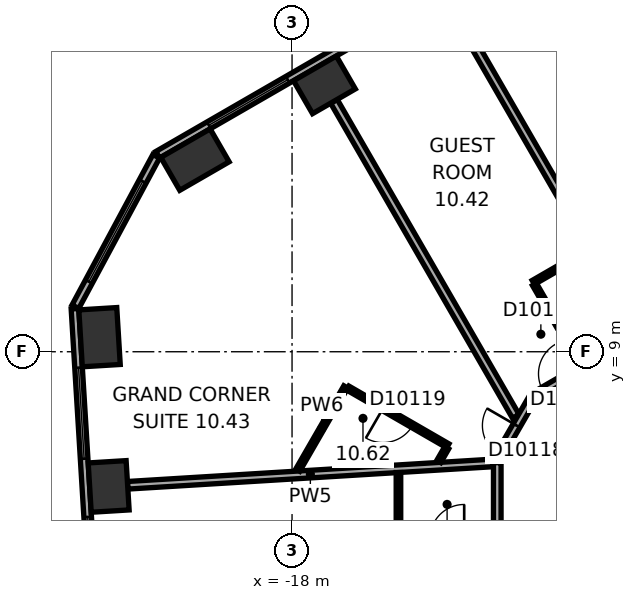
"""IFC4 building model, lengths in metres.
Left out: names, types, materials, properties, quantities, classifications, styles, units other than length and angle.
Written with IfcOpenShell. Run it as: python <this file> out.ifc"""

import sys

from ifc_helpers import new_model, si_unit, direction, frame, frame_2d, origin, origin_2d, place, context, subcontext, project, spatial, rectangle, extrude, element, fill, save


model = new_model("IFC4")
c1 = context("Model", 3, precision=1e-05, world=origin(), true_north=direction((0.0, 1.0)))
c2 = subcontext(c1, "Body", "Model", "MODEL_VIEW")
j1 = project(units=[si_unit("LENGTHUNIT", "METRE"), si_unit("PLANEANGLEUNIT", "RADIAN")], contexts=[c1])
p1 = place(None, origin())
s1 = spatial("IfcSite", under=j1, at=p1, CompositionType="ELEMENT")
p2 = place(p1, origin())
s2 = spatial("IfcBuilding", under=s1, at=p2, CompositionType="ELEMENT")
p3 = place(p2, frame((0.0, 0.0, 53.9)))
s3 = spatial("IfcBuildingStorey", under=s2, at=p3, CompositionType="ELEMENT", Elevation=53.9)
p4 = place(p3, frame((-17.148, 16.023, 0.0), z_axis=(0.0, 0.0, 1.0), x_axis=(-0.866025403784, -0.5, 0.0)))
e1 = element("IfcColumn", 1, at=p4, inside=s3, PredefinedType="COLUMN", context=c2, shape_type="SweptSolid", body=[
    extrude(rectangle(XDim=1.3, YDim=1.0, at=origin_2d()), origin(), (0.0, 0.0, 1.0), 3.3),
])
for number, where, z_axis, x_axis in (
    (2, (-20.555, 14.055, 0.0), (0.0, 0.0, 1.0), (-0.866, -0.5, 0.0)),
    (3, (-23.066, 9.383, 0.0), (0.0, 0.0, 1.0), (0.061, -0.998, 0.0)),
):
    element("IfcColumn", number, at=place(p3, frame(where, z_axis=z_axis, x_axis=x_axis)), inside=s3, PredefinedType="COLUMN", context=c2, shape_type="SweptSolid", body=[
        extrude(rectangle(XDim=1.5, YDim=1.0, at=origin_2d()), origin(), (0.0, 0.0, 1.0), 3.3),
    ])
p5 = place(p3, frame((-22.826, 5.456, 0.0), z_axis=(0.0, 0.0, 1.0), x_axis=(0.061048539535, -0.998134798422, 0.0)))
e4 = element("IfcColumn", 4, at=p5, inside=s3, PredefinedType="COLUMN", context=c2, shape_type="SweptSolid", body=[
    extrude(rectangle(XDim=1.3, YDim=1.0, at=origin_2d()), origin(), (0.0, 0.0, 1.0), 3.3),
])
p6 = place(p3, frame((-3.136, 24.805, 0.0), z_axis=(0.0, 0.0, 1.0), x_axis=(-0.866028291626, -0.499994998079, 0.0)))
e5 = element("IfcWall", 5, at=p6, inside=s3, PredefinedType="STANDARD", context=c2, shape_type="SweptSolid", body=[
    extrude(rectangle(XDim=21.246, YDim=0.2, at=frame_2d((10.623, 0.0))), origin(), (0.0, 0.0, 1.0), 3.3),
])
p7 = place(p6, frame((1.555, 0.0, 0.8)))
e6 = element("IfcOpeningElement", 6, at=p7, cuts=e5, PredefinedType="OPENING", context=c2, shape_type="SweptSolid", body=[
    extrude(rectangle(XDim=2.4, YDim=1.7, at=frame_2d((1.2, 0.85))), frame((0.0, 0.11, 0.0), z_axis=(0.0, -1.0, 0.0), x_axis=(1.0, 0.0, 0.0)), (0.0, 0.0, 1.0), 0.22),
])
p8 = place(p6, frame((5.489, 0.0, 0.8)))
e7 = element("IfcOpeningElement", 7, at=p8, cuts=e5, PredefinedType="OPENING", context=c2, shape_type="SweptSolid", body=[
    extrude(rectangle(XDim=2.4, YDim=1.7, at=frame_2d((1.2, 0.85))), frame((0.0, 0.11, 0.0), z_axis=(0.0, -1.0, 0.0), x_axis=(1.0, 0.0, 0.0)), (0.0, 0.0, 1.0), 0.22),
])
p9 = place(p6, frame((9.424, 0.0, 0.8)))
e8 = element("IfcOpeningElement", 8, at=p9, cuts=e5, PredefinedType="OPENING", context=c2, shape_type="SweptSolid", body=[
    extrude(rectangle(XDim=2.4, YDim=1.7, at=frame_2d((1.2, 0.85))), frame((0.0, 0.11, 0.0), z_axis=(0.0, -1.0, 0.0), x_axis=(1.0, 0.0, 0.0)), (0.0, 0.0, 1.0), 0.22),
])
p10 = place(p6, frame((13.358, 0.0, 0.8)))
e9 = element("IfcOpeningElement", 9, at=p10, cuts=e5, PredefinedType="OPENING", context=c2, shape_type="SweptSolid", body=[
    extrude(rectangle(XDim=2.4, YDim=1.7, at=frame_2d((1.2, 0.85))), frame((0.0, 0.11, 0.0), z_axis=(0.0, -1.0, 0.0), x_axis=(1.0, 0.0, 0.0)), (0.0, 0.0, 1.0), 0.22),
])
p11 = place(p6, frame((17.293, 0.0, 0.8)))
e10 = element("IfcOpeningElement", 10, at=p11, cuts=e5, PredefinedType="OPENING", context=c2, shape_type="SweptSolid", body=[
    extrude(rectangle(XDim=2.4, YDim=1.7, at=frame_2d((1.2, 0.85))), frame((0.0, 0.11, 0.0), z_axis=(0.0, -1.0, 0.0), x_axis=(1.0, 0.0, 0.0)), (0.0, 0.0, 1.0), 0.22),
])
p12 = place(p3, frame((-21.574, 14.143, 0.0), z_axis=(0.0, 0.0, 1.0), x_axis=(-0.473292949472, -0.880905093628, 0.0)))
e11 = element("IfcWall", 11, at=p12, inside=s3, PredefinedType="STANDARD", context=c2, shape_type="SweptSolid", body=[
    extrude(rectangle(XDim=4.494, YDim=0.2, at=frame_2d((2.247, 0.0))), origin(), (0.0, 0.0, 1.0), 3.3),
])
p13 = place(p12, frame((0.747, 0.0, 0.8)))
e12 = element("IfcOpeningElement", 12, at=p13, cuts=e11, PredefinedType="OPENING", context=c2, shape_type="SweptSolid", body=[
    extrude(rectangle(XDim=3.0, YDim=1.7, at=frame_2d((1.5, 0.85))), frame((0.0, 0.11, 0.0), z_axis=(0.0, -1.0, 0.0), x_axis=(1.0, 0.0, 0.0)), (0.0, 0.0, 1.0), 0.22),
])
p14 = place(p3, frame((-23.713, 10.131, 0.0), z_axis=(0.0, 0.0, 1.0), x_axis=(0.061040439785, -0.998135293791, 0.0)))
e13 = element("IfcWall", 13, at=p14, inside=s3, PredefinedType="STANDARD", context=c2, shape_type="SweptSolid", body=[
    extrude(rectangle(XDim=21.246, YDim=0.2, at=frame_2d((10.623, 0.0))), origin(), (0.0, 0.0, 1.0), 3.3),
])
p15 = place(p14, frame((1.553, 0.0, 0.8)))
e14 = element("IfcOpeningElement", 14, at=p15, cuts=e13, PredefinedType="OPENING", context=c2, shape_type="SweptSolid", body=[
    extrude(rectangle(XDim=2.4, YDim=1.7, at=frame_2d((1.2, 0.85))), frame((0.0, 0.11, 0.0), z_axis=(0.0, -1.0, 0.0), x_axis=(1.0, 0.0, 0.0)), (0.0, 0.0, 1.0), 0.22),
])
p16 = place(p14, frame((5.488, 0.0, 0.8)))
e15 = element("IfcOpeningElement", 15, at=p16, cuts=e13, PredefinedType="OPENING", context=c2, shape_type="SweptSolid", body=[
    extrude(rectangle(XDim=2.4, YDim=1.7, at=frame_2d((1.2, 0.85))), frame((0.0, 0.11, 0.0), z_axis=(0.0, -1.0, 0.0), x_axis=(1.0, 0.0, 0.0)), (0.0, 0.0, 1.0), 0.22),
])
p17 = place(p14, frame((9.422, 0.0, 0.8)))
e16 = element("IfcOpeningElement", 16, at=p17, cuts=e13, PredefinedType="OPENING", context=c2, shape_type="SweptSolid", body=[
    extrude(rectangle(XDim=2.4, YDim=1.7, at=frame_2d((1.2, 0.85))), frame((0.0, 0.11, 0.0), z_axis=(0.0, -1.0, 0.0), x_axis=(1.0, 0.0, 0.0)), (0.0, 0.0, 1.0), 0.22),
])
p18 = place(p14, frame((13.357, 0.0, 0.8)))
e17 = element("IfcOpeningElement", 17, at=p18, cuts=e13, PredefinedType="OPENING", context=c2, shape_type="SweptSolid", body=[
    extrude(rectangle(XDim=2.4, YDim=1.7, at=frame_2d((1.2, 0.85))), frame((0.0, 0.11, 0.0), z_axis=(0.0, -1.0, 0.0), x_axis=(1.0, 0.0, 0.0)), (0.0, 0.0, 1.0), 0.22),
])
p19 = place(p14, frame((17.292, 0.0, 0.8)))
e18 = element("IfcOpeningElement", 18, at=p19, cuts=e13, PredefinedType="OPENING", context=c2, shape_type="SweptSolid", body=[
    extrude(rectangle(XDim=2.4, YDim=1.7, at=frame_2d((1.2, 0.85))), frame((0.0, 0.11, 0.0), z_axis=(0.0, -1.0, 0.0), x_axis=(1.0, 0.0, 0.0)), (0.0, 0.0, 1.0), 0.22),
])
p20 = place(p3, frame((-22.327, 5.486, 0.0), z_axis=(0.0, 0.0, 1.0), x_axis=(0.998135194863, 0.061042057435, 0.0)))
e19 = element("IfcWall", 19, at=p20, inside=s3, PredefinedType="PARTITIONING", context=c2, shape_type="SweptSolid", body=[
    extrude(rectangle(XDim=9.635, YDim=0.2, at=frame_2d((4.817, 0.0))), origin(), (0.0, 0.0, 1.0), 3.05),
])
p21 = place(p3, frame((-17.849, 5.885, 0.0), z_axis=(0.0, 0.0, 1.0), x_axis=(0.500034589094, 0.866005432841, 0.0)))
e20 = element("IfcWall", 20, at=p21, inside=s3, PredefinedType="PARTITIONING", context=c2, shape_type="SweptSolid", body=[
    extrude(rectangle(XDim=2.528, YDim=0.12, at=frame_2d((1.264, 0.0))), origin(), (0.0, 0.0, 1.0), 3.05),
])
p22 = place(p3, frame((-16.898, 15.59, 0.0), z_axis=(0.0, 0.0, 1.0), x_axis=(0.500023458698, -0.866011859475, 0.0)))
e21 = element("IfcWall", 21, at=p22, inside=s3, PredefinedType="PARTITIONING", context=c2, shape_type="SweptSolid", body=[
    extrude(rectangle(XDim=9.572, YDim=0.2, at=frame_2d((4.786, 0.0))), origin(), (0.0, 0.0, 1.0), 3.05),
])
p23 = place(p3, frame((-16.533, 8.044, 0.0), z_axis=(0.0, 0.0, 1.0), x_axis=(0.86601037836, -0.500026023896, 0.0)))
e22 = element("IfcWall", 22, at=p23, inside=s3, PredefinedType="PARTITIONING", context=c2, shape_type="SweptSolid", body=[
    extrude(rectangle(XDim=3.04, YDim=0.12, at=frame_2d((1.52, 0.0))), origin(), (0.0, 0.0, 1.0), 3.05),
])
p24 = place(p23, frame((1.07, 0.0, 0.0)))
e23 = element("IfcOpeningElement", 23, at=p24, cuts=e22, PredefinedType="OPENING", context=c2, shape_type="SweptSolid", body=[
    extrude(rectangle(XDim=0.9, YDim=2.1, at=frame_2d((0.45, 1.05))), frame((0.0, 0.07, 0.0), z_axis=(0.0, -1.0, 0.0), x_axis=(1.0, 0.0, 0.0)), (0.0, 0.0, 1.0), 0.14),
])
p25 = place(p3, frame((-15.2, 4.081, 0.0), z_axis=(0.0, 0.0, 1.0), x_axis=(0.0, 1.0, 0.0)))
e24 = element("IfcWall", 24, at=p25, inside=s3, PredefinedType="PARTITIONING", context=c2, shape_type="SweptSolid", body=[
    extrude(rectangle(XDim=1.741, YDim=0.12, at=frame_2d((0.871, 0.0))), origin(), (0.0, 0.0, 1.0), 3.05),
])
p26 = place(p3, frame((-13.931, 6.472, 0.0), z_axis=(0.0, 0.0, 1.0), x_axis=(-0.499739399214, -0.866175809448, 0.0)))
e25 = element("IfcWall", 25, at=p26, inside=s3, PredefinedType="PARTITIONING", context=c2, shape_type="SweptSolid", body=[
    extrude(rectangle(XDim=0.416, YDim=0.12, at=frame_2d((0.208, 0.0))), origin(), (0.0, 0.0, 1.0), 3.05),
])
p27 = place(p3, frame((-12.6, 6.081, 0.0), z_axis=(0.0, 0.0, 1.0), x_axis=(0.0, -1.0, 0.0)))
e26 = element("IfcWall", 26, at=p27, inside=s3, PredefinedType="PARTITIONING", context=c2, shape_type="SweptSolid", body=[
    extrude(rectangle(XDim=12.219, YDim=0.2, at=frame_2d((6.109, 0.0))), origin(), (0.0, 0.0, 1.0), 3.05),
])
p28 = place(p27, frame((2.546, 0.0, 0.0)))
e27 = element("IfcOpeningElement", 27, at=p28, cuts=e26, PredefinedType="OPENING", context=c2, shape_type="SweptSolid", body=[
    extrude(rectangle(XDim=0.9, YDim=2.1, at=frame_2d((0.45, 1.05))), frame((0.0, 0.11, 0.0), z_axis=(0.0, -1.0, 0.0), x_axis=(1.0, 0.0, 0.0)), (0.0, 0.0, 1.0), 0.22),
])
p29 = place(p27, frame((4.217, 0.0, 0.0)))
e28 = element("IfcOpeningElement", 28, at=p29, cuts=e26, PredefinedType="OPENING", context=c2, shape_type="SweptSolid", body=[
    extrude(rectangle(XDim=0.9, YDim=2.1, at=frame_2d((0.45, 1.05))), frame((0.0, 0.11, 0.0), z_axis=(0.0, -1.0, 0.0), x_axis=(1.0, 0.0, 0.0)), (0.0, 0.0, 1.0), 0.22),
])
p30 = place(p27, frame((10.43, 0.0, 0.0)))
e29 = element("IfcOpeningElement", 29, at=p30, cuts=e26, PredefinedType="OPENING", context=c2, shape_type="SweptSolid", body=[
    extrude(rectangle(XDim=0.9, YDim=2.1, at=frame_2d((0.45, 1.05))), frame((0.0, 0.11, 0.0), z_axis=(0.0, -1.0, 0.0), x_axis=(1.0, 0.0, 0.0)), (0.0, 0.0, 1.0), 0.22),
])
p31 = place(p3, frame((-11.65, 7.823, 0.0), z_axis=(0.0, 0.0, 1.0), x_axis=(-0.500063520245, -0.865988727248, 0.0)))
e30 = element("IfcWall", 30, at=p31, inside=s3, PredefinedType="PARTITIONING", context=c2, shape_type="SweptSolid", body=[
    extrude(rectangle(XDim=1.9, YDim=0.2, at=frame_2d((0.95, 0.0))), origin(), (0.0, 0.0, 1.0), 3.05),
])
p32 = place(p31, frame((0.882, 0.0, 0.0)))
e31 = element("IfcOpeningElement", 31, at=p32, cuts=e30, PredefinedType="OPENING", context=c2, shape_type="SweptSolid", body=[
    extrude(rectangle(XDim=0.9, YDim=2.1, at=frame_2d((0.45, 1.05))), frame((0.0, 0.11, 0.0), z_axis=(0.0, -1.0, 0.0), x_axis=(1.0, 0.0, 0.0)), (0.0, 0.0, 1.0), 0.22),
])
p33 = place(p3, frame((-11.651, 10.825, 0.0), z_axis=(0.0, 0.0, 1.0), x_axis=(0.865998477143, 0.500046635412, 0.0)))
e32 = element("IfcWall", 32, at=p33, inside=s3, PredefinedType="PARTITIONING", context=c2, shape_type="SweptSolid", body=[
    extrude(rectangle(XDim=1.673, YDim=0.12, at=frame_2d((0.836, 0.0))), origin(), (0.0, 0.0, 1.0), 3.05),
])
p34 = place(p3, frame((-10.401, 8.66, 0.0), z_axis=(0.0, 0.0, 1.0), x_axis=(-0.500077547548, 0.865980627057, 0.0)))
e33 = element("IfcWall", 33, at=p34, inside=s3, PredefinedType="PARTITIONING", context=c2, shape_type="SweptSolid", body=[
    extrude(rectangle(XDim=2.44, YDim=0.12, at=frame_2d((1.22, 0.0))), origin(), (0.0, 0.0, 1.0), 3.05),
])
p35 = place(p34, frame((0.77, 0.0, 0.0)))
e34 = element("IfcOpeningElement", 34, at=p35, cuts=e33, PredefinedType="OPENING", context=c2, shape_type="SweptSolid", body=[
    extrude(rectangle(XDim=0.9, YDim=2.1, at=frame_2d((0.45, 1.05))), frame((0.0, 0.07, 0.0), z_axis=(0.0, -1.0, 0.0), x_axis=(1.0, 0.0, 0.0)), (0.0, 0.0, 1.0), 0.14),
])
p36 = place(p3, frame((-8.902, 9.41, 0.0), z_axis=(0.0, 0.0, 1.0), x_axis=(-0.866014299198, -0.500019233215, 0.0)))
e35 = element("IfcWall", 35, at=p36, inside=s3, PredefinedType="PARTITIONING", context=c2, shape_type="SweptSolid", body=[
    extrude(rectangle(XDim=3.133, YDim=0.2, at=frame_2d((1.567, 0.0))), origin(), (0.0, 0.0, 1.0), 3.05),
])
p37 = place(p36, frame((1.978, 0.0, 0.0)))
e36 = element("IfcOpeningElement", 36, at=p37, cuts=e35, PredefinedType="OPENING", context=c2, shape_type="SweptSolid", body=[
    extrude(rectangle(XDim=0.9, YDim=2.1, at=frame_2d((0.45, 1.05))), frame((0.0, 0.11, 0.0), z_axis=(0.0, -1.0, 0.0), x_axis=(1.0, 0.0, 0.0)), (0.0, 0.0, 1.0), 0.22),
])
p38 = place(p3, frame((-7.865, 7.814, 0.0), z_axis=(0.0, 0.0, 1.0), x_axis=(-0.500004234368, 0.866022959057, 0.0)))
e37 = element("IfcWall", 37, at=p38, inside=s3, PredefinedType="PARTITIONING", context=c2, shape_type="SweptSolid", body=[
    extrude(rectangle(XDim=11.25, YDim=0.2, at=frame_2d((5.625, 0.0))), origin(), (0.0, 0.0, 1.0), 3.05),
])
p39 = place(p38, frame((0.5, 0.0, 0.0)))
e38 = element("IfcOpeningElement", 38, at=p39, cuts=e37, PredefinedType="OPENING", context=c2, shape_type="SweptSolid", body=[
    extrude(rectangle(XDim=0.9, YDim=2.1, at=frame_2d((0.45, 1.05))), frame((0.0, 0.11, 0.0), z_axis=(0.0, -1.0, 0.0), x_axis=(1.0, 0.0, 0.0)), (0.0, 0.0, 1.0), 0.22),
])
p40 = place(p11, origin())
e39 = element("IfcWindow", 39, at=p40, inside=s3, PartitioningType="SINGLE_PANEL", PredefinedType="WINDOW", context=c2, shape_type="SweptSolid", body=[
    extrude(rectangle(XDim=2.4, YDim=1.7, at=frame_2d((1.2, 0.85))), frame((0.0, 0.03, 0.0), z_axis=(0.0, -1.0, 0.0), x_axis=(1.0, 0.0, 0.0)), (0.0, 0.0, 1.0), 0.06),
])
fill(e10, e39)
p41 = place(p13, origin())
e40 = element("IfcWindow", 40, at=p41, inside=s3, PartitioningType="SINGLE_PANEL", PredefinedType="WINDOW", context=c2, shape_type="SweptSolid", body=[
    extrude(rectangle(XDim=3.0, YDim=1.7, at=frame_2d((1.5, 0.85))), frame((0.0, 0.03, 0.0), z_axis=(0.0, -1.0, 0.0), x_axis=(1.0, 0.0, 0.0)), (0.0, 0.0, 1.0), 0.06),
])
fill(e12, e40)
p42 = place(p15, origin())
e41 = element("IfcWindow", 41, at=p42, inside=s3, PartitioningType="SINGLE_PANEL", PredefinedType="WINDOW", context=c2, shape_type="SweptSolid", body=[
    extrude(rectangle(XDim=2.4, YDim=1.7, at=frame_2d((1.2, 0.85))), frame((0.0, 0.03, 0.0), z_axis=(0.0, -1.0, 0.0), x_axis=(1.0, 0.0, 0.0)), (0.0, 0.0, 1.0), 0.06),
])
fill(e14, e41)
p43 = place(p16, origin())
e42 = element("IfcWindow", 42, at=p43, inside=s3, PartitioningType="SINGLE_PANEL", PredefinedType="WINDOW", context=c2, shape_type="SweptSolid", body=[
    extrude(rectangle(XDim=2.4, YDim=1.7, at=frame_2d((1.2, 0.85))), frame((0.0, 0.03, 0.0), z_axis=(0.0, -1.0, 0.0), x_axis=(1.0, 0.0, 0.0)), (0.0, 0.0, 1.0), 0.06),
])
fill(e15, e42)
p44 = place(p37, origin())
e43 = element("IfcDoor", 43, at=p44, inside=s3, OperationType="SINGLE_SWING_LEFT", PredefinedType="DOOR", context=c2, shape_type="SweptSolid", body=[
    extrude(rectangle(XDim=0.9, YDim=2.1, at=frame_2d((0.45, 1.05))), frame((0.0, 0.025, 0.0), z_axis=(0.0, -1.0, 0.0), x_axis=(1.0, 0.0, 0.0)), (0.0, 0.0, 1.0), 0.05),
])
fill(e36, e43)
p45 = place(p35, origin())
e44 = element("IfcDoor", 44, at=p45, inside=s3, OperationType="SINGLE_SWING_LEFT", PredefinedType="DOOR", context=c2, shape_type="SweptSolid", body=[
    extrude(rectangle(XDim=0.9, YDim=2.1, at=frame_2d((0.45, 1.05))), frame((0.0, 0.025, 0.0), z_axis=(0.0, -1.0, 0.0), x_axis=(1.0, 0.0, 0.0)), (0.0, 0.0, 1.0), 0.05),
])
fill(e34, e44)
p46 = place(p32, origin())
e45 = element("IfcDoor", 45, at=p46, inside=s3, OperationType="SINGLE_SWING_LEFT", PredefinedType="DOOR", context=c2, shape_type="SweptSolid", body=[
    extrude(rectangle(XDim=0.9, YDim=2.1, at=frame_2d((0.45, 1.05))), frame((0.0, 0.025, 0.0), z_axis=(0.0, -1.0, 0.0), x_axis=(1.0, 0.0, 0.0)), (0.0, 0.0, 1.0), 0.05),
])
fill(e31, e45)
p47 = place(p24, origin())
e46 = element("IfcDoor", 46, at=p47, inside=s3, OperationType="SINGLE_SWING_LEFT", PredefinedType="DOOR", context=c2, shape_type="SweptSolid", body=[
    extrude(rectangle(XDim=0.9, YDim=2.1, at=frame_2d((0.45, 1.05))), frame((0.0, 0.025, 0.0), z_axis=(0.0, -1.0, 0.0), x_axis=(1.0, 0.0, 0.0)), (0.0, 0.0, 1.0), 0.05),
])
fill(e23, e46)
save(model, sys.argv[1])
